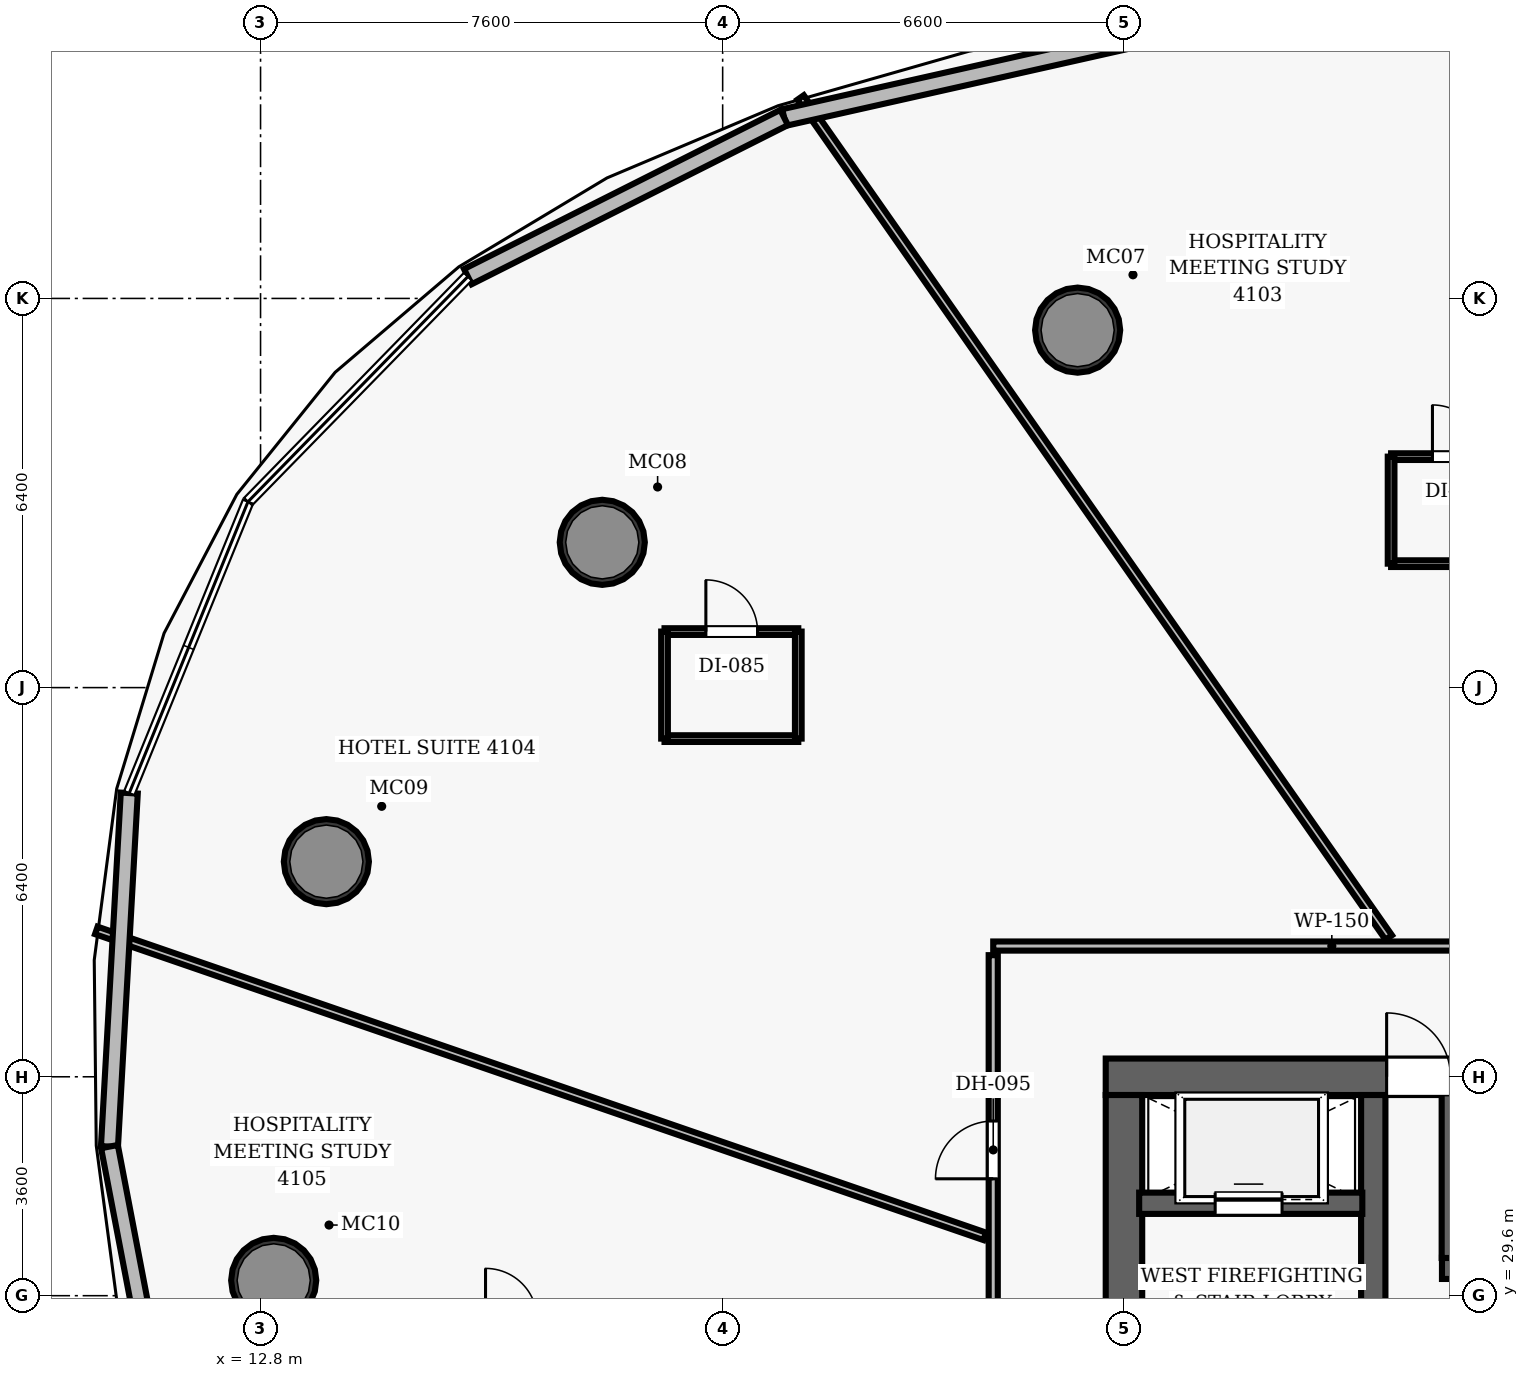
"""IFC4 building model, lengths in metres.
Left out: names, types, materials, properties, quantities, classifications, styles, units other than length and angle.
Written with IfcOpenShell. Run it as: python <this file> out.ifc"""

import sys

from ifc_helpers import new_model, si_unit, direction, frame, frame_2d, origin, origin_2d, place, context, subcontext, project, spatial, rectangle, hollow_circle, extrude, element, fill, save


model = new_model("IFC4")
c1 = context("Model", 3, precision=1e-05, world=origin(), true_north=direction((0.0, 1.0)))
c2 = subcontext(c1, "Body", "Model", "MODEL_VIEW")
j1 = project(units=[si_unit("LENGTHUNIT", "METRE"), si_unit("PLANEANGLEUNIT", "RADIAN")], contexts=[c1])
p1 = place(None, origin())
s1 = spatial("IfcSite", under=j1, at=p1, CompositionType="ELEMENT")
p2 = place(p1, origin())
s2 = spatial("IfcBuilding", under=s1, at=p2, CompositionType="ELEMENT")
p3 = place(p2, frame((0.0, 0.0, 162.3)))
s3 = spatial("IfcBuildingStorey", under=s2, at=p3, CompositionType="ELEMENT", Elevation=162.3)
p4 = place(p3, frame((26.7, 33.2, 0.0), z_axis=(0.0, 0.0, 1.0), x_axis=(1.0, 0.0, 0.0)))
e1 = element("IfcWall", 1, at=p4, inside=s3, PredefinedType="SHEAR", context=c2, shape_type="SweptSolid", body=[
    extrude(rectangle(XDim=22.6, YDim=0.6, at=frame_2d((11.3, 0.0))), origin(), (0.0, 0.0, 1.0), 3.5),
])
p5 = place(p4, frame((4.62, 0.0, 0.0)))
e2 = element("IfcOpeningElement", 2, at=p5, cuts=e1, PredefinedType="OPENING", context=c2, shape_type="SweptSolid", body=[
    extrude(rectangle(XDim=1.05, YDim=2.15, at=frame_2d((0.525, 1.075))), frame((0.0, 0.31, 0.0), z_axis=(0.0, -1.0, 0.0), x_axis=(1.0, 0.0, 0.0)), (0.0, 0.0, 1.0), 0.62),
])
p6 = place(p4, frame((14.52, 0.0, 0.0)))
e3 = element("IfcOpeningElement", 3, at=p6, cuts=e1, PredefinedType="OPENING", context=c2, shape_type="SweptSolid", body=[
    extrude(rectangle(XDim=1.05, YDim=2.15, at=frame_2d((0.525, 1.075))), frame((0.0, 0.31, 0.0), z_axis=(0.0, -1.0, 0.0), x_axis=(1.0, 0.0, 0.0)), (0.0, 0.0, 1.0), 0.62),
])
p7 = place(p3, frame((27.0, 19.1, 0.0), z_axis=(0.0, 0.0, 1.0), x_axis=(0.0, 1.0, 0.0)))
e4 = element("IfcWall", 4, at=p7, inside=s3, PredefinedType="SHEAR", context=c2, shape_type="SweptSolid", body=[
    extrude(rectangle(XDim=13.8, YDim=0.6, at=frame_2d((6.9, 0.0))), origin(), (0.0, 0.0, 1.0), 3.5),
])
p8 = place(p7, frame((8.2, 0.0, 0.0)))
e5 = element("IfcOpeningElement", 5, at=p8, cuts=e4, PredefinedType="OPENING", context=c2, shape_type="SweptSolid", body=[
    extrude(rectangle(XDim=1.05, YDim=2.15, at=frame_2d((0.525, 1.075))), frame((0.0, 0.31, 0.0), z_axis=(0.0, -1.0, 0.0), x_axis=(1.0, 0.0, 0.0)), (0.0, 0.0, 1.0), 0.62),
])
p9 = place(p3, frame((31.1, 19.1, 0.0), z_axis=(0.0, 0.0, 1.0), x_axis=(0.0, 1.0, 0.0)))
e6 = element("IfcWall", 6, at=p9, inside=s3, PredefinedType="SHEAR", context=c2, shape_type="SweptSolid", body=[
    extrude(rectangle(XDim=13.8, YDim=0.4, at=frame_2d((6.9, 0.0))), origin(), (0.0, 0.0, 1.0), 3.5),
])
for number, where, z_axis, x_axis in (
    (7, (26.238, 45.479, 0.0), (0.0, 0.0, 1.0), (1.0, 0.0, 0.0)),
    (8, (18.42, 41.989, 0.0), (0.0, 0.0, 1.0), (1.0, 0.0, 0.0)),
    (9, (13.882, 36.738, 0.0), (0.0, 0.0, 1.0), (1.0, 0.0, 0.0)),
    (10, (13.016, 29.852, 0.0), (0.0, 0.0, 1.0), (1.0, 0.0, 0.0)),
):
    element("IfcColumn", number, at=place(p3, frame(where, z_axis=z_axis, x_axis=x_axis)), inside=s3, PredefinedType="COLUMN", context=c2, shape_type="SweptSolid", body=[
        extrude(hollow_circle(Radius=0.7, WallThickness=0.055, at=origin_2d()), origin(), (0.0, 0.0, 1.0), 3.5),
    ])
p10 = place(p3, frame((27.25, 31.12, 0.0), z_axis=(0.0, 0.0, 1.0), x_axis=(1.0, 0.0, 0.0)))
e11 = element("IfcWall", 11, at=p10, inside=s3, PredefinedType="SHEAR", context=c2, shape_type="SweptSolid", body=[
    extrude(rectangle(XDim=3.67, YDim=0.35, at=frame_2d((1.835, 0.0))), origin(), (0.0, 0.0, 1.0), 2.565),
])
p11 = place(p10, frame((1.25, 0.0, 0.0)))
e12 = element("IfcOpeningElement", 12, at=p11, cuts=e11, PredefinedType="OPENING", context=c2, shape_type="SweptSolid", body=[
    extrude(rectangle(XDim=1.1, YDim=2.15, at=frame_2d((0.55, 1.075))), frame((0.0, 0.185, 0.0), z_axis=(0.0, -1.0, 0.0), x_axis=(1.0, 0.0, 0.0)), (0.0, 0.0, 1.0), 0.37),
])
p12 = place(p3, frame((32.23, 30.05, 0.0), z_axis=(0.0, 0.0, 1.0), x_axis=(1.0, 0.0, 0.0)))
e13 = element("IfcWall", 13, at=p12, inside=s3, PredefinedType="SHEAR", context=c2, shape_type="SweptSolid", body=[
    extrude(rectangle(XDim=2.41, YDim=0.35, at=frame_2d((1.205, 0.0))), origin(), (0.0, 0.0, 1.0), 2.565),
])
p13 = place(p12, frame((0.42, 0.0, 0.0)))
e14 = element("IfcOpeningElement", 14, at=p13, cuts=e13, PredefinedType="OPENING", context=c2, shape_type="SweptSolid", body=[
    extrude(rectangle(XDim=0.8, YDim=2.15, at=frame_2d((0.4, 1.075))), frame((0.0, 0.185, 0.0), z_axis=(0.0, -1.0, 0.0), x_axis=(1.0, 0.0, 0.0)), (0.0, 0.0, 1.0), 0.37),
])
p14 = place(p12, frame((1.42, 0.0, 0.0)))
e15 = element("IfcOpeningElement", 15, at=p14, cuts=e13, PredefinedType="OPENING", context=c2, shape_type="SweptSolid", body=[
    extrude(rectangle(XDim=0.8, YDim=2.15, at=frame_2d((0.4, 1.075))), frame((0.0, 0.185, 0.0), z_axis=(0.0, -1.0, 0.0), x_axis=(1.0, 0.0, 0.0)), (0.0, 0.0, 1.0), 0.37),
])
p15 = place(p3, frame((32.4, 30.22, 0.0), z_axis=(0.0, 0.0, 1.0), x_axis=(0.0, 1.0, 0.0)))
e16 = element("IfcWall", 16, at=p15, inside=s3, PredefinedType="SHEAR", context=c2, shape_type="SweptSolid", body=[
    extrude(rectangle(XDim=2.73, YDim=0.35, at=frame_2d((1.365, 0.0))), origin(), (0.0, 0.0, 1.0), 2.565),
])
p16 = place(p3, frame((24.85, 35.35, 0.0), z_axis=(0.0, 0.0, 1.0), x_axis=(1.0, 0.0, 0.0)))
e17 = element("IfcWall", 17, at=p16, inside=s3, PredefinedType="PARTITIONING", context=c2, shape_type="SweptSolid", body=[
    extrude(rectangle(XDim=26.0, YDim=0.15, at=frame_2d((13.0, 0.0))), origin(), (0.0, 0.0, 1.0), 2.565),
])
p17 = place(p16, frame((21.017, 0.0, 0.0)))
e18 = element("IfcOpeningElement", 18, at=p17, cuts=e17, PredefinedType="OPENING", context=c2, shape_type="SweptSolid", body=[
    extrude(rectangle(XDim=0.95, YDim=2.15, at=frame_2d((0.475, 1.075))), frame((0.0, 0.085, 0.0), z_axis=(0.0, -1.0, 0.0), x_axis=(1.0, 0.0, 0.0)), (0.0, 0.0, 1.0), 0.17),
])
p18 = place(p16, frame((14.438, 0.0, 0.0)))
e19 = element("IfcOpeningElement", 19, at=p18, cuts=e17, PredefinedType="OPENING", context=c2, shape_type="SweptSolid", body=[
    extrude(rectangle(XDim=0.95, YDim=2.15, at=frame_2d((0.475, 1.075))), frame((0.0, 0.085, 0.0), z_axis=(0.0, -1.0, 0.0), x_axis=(1.0, 0.0, 0.0)), (0.0, 0.0, 1.0), 0.17),
])
p19 = place(p16, frame((11.287, 0.0, 0.0)))
e20 = element("IfcOpeningElement", 20, at=p19, cuts=e17, PredefinedType="OPENING", context=c2, shape_type="SweptSolid", body=[
    extrude(rectangle(XDim=0.95, YDim=2.15, at=frame_2d((0.475, 1.075))), frame((0.0, 0.085, 0.0), z_axis=(0.0, -1.0, 0.0), x_axis=(1.0, 0.0, 0.0)), (0.0, 0.0, 1.0), 0.17),
])
p20 = place(p3, frame((24.85, 27.08, 0.0), z_axis=(0.0, 0.0, 1.0), x_axis=(0.0, 1.0, 0.0)))
e21 = element("IfcWall", 21, at=p20, inside=s3, PredefinedType="PARTITIONING", context=c2, shape_type="SweptSolid", body=[
    extrude(rectangle(XDim=8.12, YDim=0.15, at=frame_2d((4.06, 0.0))), origin(), (0.0, 0.0, 1.0), 2.565),
])
p21 = place(p20, frame((4.442, 0.0, 0.0)))
e22 = element("IfcOpeningElement", 22, at=p21, cuts=e21, PredefinedType="OPENING", context=c2, shape_type="SweptSolid", body=[
    extrude(rectangle(XDim=0.95, YDim=2.15, at=frame_2d((0.475, 1.075))), frame((0.0, 0.085, 0.0), z_axis=(0.0, -1.0, 0.0), x_axis=(1.0, 0.0, 0.0)), (0.0, 0.0, 1.0), 0.17),
])
p22 = place(p3, frame((31.355, 35.49, 0.0), z_axis=(0.0, 0.0, 1.0), x_axis=(-0.573576982677, 0.819151661747, 0.0)))
e23 = element("IfcWall", 23, at=p22, inside=s3, PredefinedType="PARTITIONING", context=c2, shape_type="SweptSolid", body=[
    extrude(rectangle(XDim=16.865, YDim=0.13, at=frame_2d((8.433, 0.0))), origin(), (0.0, 0.0, 1.0), 2.565),
])
p23 = place(p3, frame((24.71, 30.576, 0.0), z_axis=(0.0, 0.0, 1.0), x_axis=(-0.945518452422, 0.32556851219, 0.0)))
e24 = element("IfcWall", 24, at=p23, inside=s3, PredefinedType="PARTITIONING", context=c2, shape_type="SweptSolid", body=[
    extrude(rectangle(XDim=15.453, YDim=0.13, at=frame_2d((7.727, 0.0))), origin(), (0.0, 0.0, 1.0), 2.565),
])
p24 = place(p3, frame((31.393, 41.638, 0.0), z_axis=(0.0, 0.0, 1.0), x_axis=(1.0, 0.0, 0.0)))
e25 = element("IfcWall", 25, at=p24, inside=s3, PredefinedType="PARTITIONING", context=c2, shape_type="SweptSolid", body=[
    extrude(rectangle(XDim=2.2, YDim=0.11, at=frame_2d((1.1, 0.0))), origin(), (0.0, 0.0, 1.0), 2.565),
])
p25 = place(p3, frame((31.393, 43.398, 0.0), z_axis=(0.0, 0.0, 1.0), x_axis=(1.0, 0.0, 0.0)))
e26 = element("IfcWall", 26, at=p25, inside=s3, PredefinedType="PARTITIONING", context=c2, shape_type="SweptSolid", body=[
    extrude(rectangle(XDim=2.2, YDim=0.11, at=frame_2d((1.1, 0.0))), origin(), (0.0, 0.0, 1.0), 2.565),
])
p26 = place(p25, frame((0.68, 0.0, 0.0)))
e27 = element("IfcOpeningElement", 27, at=p26, cuts=e26, PredefinedType="OPENING", context=c2, shape_type="SweptSolid", body=[
    extrude(rectangle(XDim=0.85, YDim=2.1, at=frame_2d((0.425, 1.05))), frame((0.0, 0.065, 0.0), z_axis=(0.0, -1.0, 0.0), x_axis=(1.0, 0.0, 0.0)), (0.0, 0.0, 1.0), 0.13),
])
p27 = place(p3, frame((31.393, 41.638, 0.0), z_axis=(0.0, 0.0, 1.0), x_axis=(0.0, 1.0, 0.0)))
e28 = element("IfcWall", 28, at=p27, inside=s3, PredefinedType="PARTITIONING", context=c2, shape_type="SweptSolid", body=[
    extrude(rectangle(XDim=1.76, YDim=0.11, at=frame_2d((0.88, 0.0))), origin(), (0.0, 0.0, 1.0), 2.565),
])
p28 = place(p3, frame((19.444, 38.761, 0.0), z_axis=(0.0, 0.0, 1.0), x_axis=(1.0, 0.0, 0.0)))
e29 = element("IfcWall", 29, at=p28, inside=s3, PredefinedType="PARTITIONING", context=c2, shape_type="SweptSolid", body=[
    extrude(rectangle(XDim=2.2, YDim=0.11, at=frame_2d((1.1, 0.0))), origin(), (0.0, 0.0, 1.0), 2.565),
])
p29 = place(p3, frame((19.444, 40.521, 0.0), z_axis=(0.0, 0.0, 1.0), x_axis=(1.0, 0.0, 0.0)))
e30 = element("IfcWall", 30, at=p29, inside=s3, PredefinedType="PARTITIONING", context=c2, shape_type="SweptSolid", body=[
    extrude(rectangle(XDim=2.2, YDim=0.11, at=frame_2d((1.1, 0.0))), origin(), (0.0, 0.0, 1.0), 2.565),
])
p30 = place(p29, frame((0.68, 0.0, 0.0)))
e31 = element("IfcOpeningElement", 31, at=p30, cuts=e30, PredefinedType="OPENING", context=c2, shape_type="SweptSolid", body=[
    extrude(rectangle(XDim=0.85, YDim=2.1, at=frame_2d((0.425, 1.05))), frame((0.0, 0.065, 0.0), z_axis=(0.0, -1.0, 0.0), x_axis=(1.0, 0.0, 0.0)), (0.0, 0.0, 1.0), 0.13),
])
for number, where, z_axis, x_axis in (
    (32, (19.444, 38.761, 0.0), (0.0, 0.0, 1.0), (0.0, 1.0, 0.0)),
    (33, (21.644, 38.761, 0.0), (0.0, 0.0, 1.0), (0.0, 1.0, 0.0)),
):
    element("IfcWall", number, at=place(p3, frame(where, z_axis=z_axis, x_axis=x_axis)), inside=s3, PredefinedType="PARTITIONING", context=c2, shape_type="SweptSolid", body=[
        extrude(rectangle(XDim=1.76, YDim=0.11, at=frame_2d((0.88, 0.0))), origin(), (0.0, 0.0, 1.0), 2.565),
    ])
p31 = place(p3, frame((21.411, 48.976, 0.0), z_axis=(0.0, 0.0, 1.0), x_axis=(0.975681090839, 0.219194910932, 0.0)))
e34 = element("IfcWall", 34, at=p31, inside=s3, PredefinedType="SOLIDWALL", context=c2, shape_type="SweptSolid", body=[
    extrude(rectangle(XDim=6.665, YDim=0.28, at=frame_2d((3.333, 0.0))), origin(), (0.0, 0.0, 1.0), 3.15),
])
for number, where, z_axis, x_axis in (
    (35, (16.209, 46.359, 0.0), (0.0, 0.0, 1.0), (0.893, 0.449, 0.0)),
    (36, (10.315, 32.052, 0.0), (0.0, 0.0, 1.0), (0.056, 0.998, 0.0)),
):
    element("IfcWall", number, at=place(p3, frame(where, z_axis=z_axis, x_axis=x_axis)), inside=s3, PredefinedType="SOLIDWALL", context=c2, shape_type="SweptSolid", body=[
        extrude(rectangle(XDim=5.823, YDim=0.28, at=frame_2d((2.911, 0.0))), origin(), (0.0, 0.0, 1.0), 3.15),
    ])
p32 = place(p3, frame((11.568, 25.506, 0.0), z_axis=(0.0, 0.0, 1.0), x_axis=(-0.188022651866, 0.982164692088, 0.0)))
e37 = element("IfcWall", 37, at=p32, inside=s3, PredefinedType="SOLIDWALL", context=c2, shape_type="SweptSolid", body=[
    extrude(rectangle(XDim=6.665, YDim=0.28, at=frame_2d((3.333, 0.0))), origin(), (0.0, 0.0, 1.0), 3.15),
])
p33 = place(p5, origin())
e38 = element("IfcDoor", 38, at=p33, inside=s3, OperationType="SINGLE_SWING_LEFT", PredefinedType="DOOR", context=c2, shape_type="SweptSolid", body=[
    extrude(rectangle(XDim=1.05, YDim=2.15, at=frame_2d((0.525, 1.075))), frame((0.0, 0.025, 0.0), z_axis=(0.0, -1.0, 0.0), x_axis=(1.0, 0.0, 0.0)), (0.0, 0.0, 1.0), 0.05),
])
fill(e2, e38)
p34 = place(p26, origin())
e39 = element("IfcDoor", 39, at=p34, inside=s3, OperationType="SINGLE_SWING_LEFT", PredefinedType="DOOR", context=c2, shape_type="SweptSolid", body=[
    extrude(rectangle(XDim=0.85, YDim=2.1, at=frame_2d((0.425, 1.05))), frame((0.0, 0.025, 0.0), z_axis=(0.0, -1.0, 0.0), x_axis=(1.0, 0.0, 0.0)), (0.0, 0.0, 1.0), 0.05),
])
fill(e27, e39)
p35 = place(p21, origin())
e40 = element("IfcDoor", 40, at=p35, inside=s3, OperationType="SINGLE_SWING_LEFT", PredefinedType="DOOR", context=c2, shape_type="SweptSolid", body=[
    extrude(rectangle(XDim=0.95, YDim=2.15, at=frame_2d((0.475, 1.075))), frame((0.0, 0.025, 0.0), z_axis=(0.0, -1.0, 0.0), x_axis=(1.0, 0.0, 0.0)), (0.0, 0.0, 1.0), 0.05),
])
fill(e22, e40)
p36 = place(p30, origin())
e41 = element("IfcDoor", 41, at=p36, inside=s3, OperationType="SINGLE_SWING_LEFT", PredefinedType="DOOR", context=c2, shape_type="SweptSolid", body=[
    extrude(rectangle(XDim=0.85, YDim=2.1, at=frame_2d((0.425, 1.05))), frame((0.0, 0.025, 0.0), z_axis=(0.0, -1.0, 0.0), x_axis=(1.0, 0.0, 0.0)), (0.0, 0.0, 1.0), 0.05),
])
fill(e31, e41)
p37 = place(p11, origin())
e42 = element("IfcDoor", 42, at=p37, inside=s3, OperationType="SLIDING_TO_LEFT", PredefinedType="DOOR", context=c2, shape_type="SweptSolid", body=[
    extrude(rectangle(XDim=1.1, YDim=2.15, at=frame_2d((0.55, 1.075))), frame((0.0, 0.025, 0.0), z_axis=(0.0, -1.0, 0.0), x_axis=(1.0, 0.0, 0.0)), (0.0, 0.0, 1.0), 0.05),
])
fill(e12, e42)
save(model, sys.argv[1])
